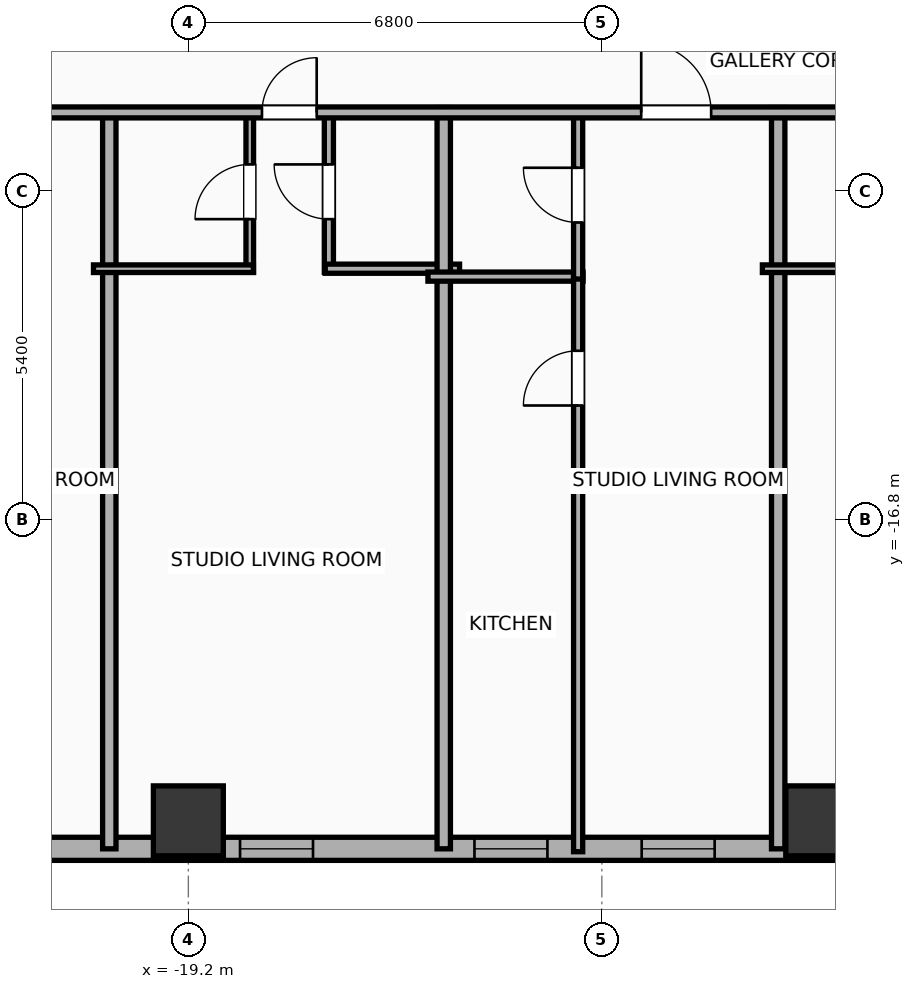
"""IFC4 building model, lengths in metres.
Left out: names, types, materials, properties, quantities, classifications, styles, units other than length and angle.
Written with IfcOpenShell. Run it as: python <this file> out.ifc"""

import sys

from ifc_helpers import new_model, si_unit, direction, frame, frame_2d, origin, origin_2d, place, context, subcontext, project, spatial, rectangle, hollow_rectangle, extrude, element, fill, save


model = new_model("IFC4")
c1 = context("Model", 3, precision=1e-05, world=origin(), true_north=direction((0.0, 1.0)))
c2 = subcontext(c1, "Body", "Model", "MODEL_VIEW")
j1 = project(units=[si_unit("LENGTHUNIT", "METRE"), si_unit("PLANEANGLEUNIT", "RADIAN")], contexts=[c1])
p1 = place(None, origin())
s1 = spatial("IfcSite", under=j1, at=p1, CompositionType="ELEMENT")
p2 = place(p1, origin())
s2 = spatial("IfcBuilding", under=s1, at=p2, CompositionType="ELEMENT")
p3 = place(p2, frame((0.0, 0.0, 68.9)))
s3 = spatial("IfcBuildingStorey", under=s2, at=p3, CompositionType="ELEMENT", Elevation=68.9)
for number, where, z_axis, x_axis in (
    (1, (-19.2, -21.75, 0.0), (0.0, 0.0, 1.0), (1.0, 0.0, 0.0)),
    (2, (-8.8, -21.75, 0.0), (0.0, 0.0, 1.0), (1.0, 0.0, 0.0)),
):
    element("IfcColumn", number, at=place(p3, frame(where, z_axis=z_axis, x_axis=x_axis)), inside=s3, PredefinedType="COLUMN", context=c2, shape_type="SweptSolid", body=[
        extrude(hollow_rectangle(XDim=1.15, YDim=1.15, WallThickness=0.04, at=origin_2d()), origin(), (0.0, 0.0, 1.0), 3.9),
    ])
p4 = place(p3, frame((22.381, -22.21, 0.0), z_axis=(0.0, 0.0, 1.0), x_axis=(-1.0, 0.0, 0.0)))
e3 = element("IfcWall", 3, at=p4, inside=s3, PredefinedType="ELEMENTEDWALL", context=c2, shape_type="SweptSolid", body=[
    extrude(rectangle(XDim=51.963, YDim=0.38, at=frame_2d((25.981, 0.0))), origin(), (0.0, 0.0, 1.0), 3.65),
])
p5 = place(p4, frame((49.127, 0.0, 0.75)))
e4 = element("IfcOpeningElement", 4, at=p5, cuts=e3, PredefinedType="OPENING", context=c2, shape_type="SweptSolid", body=[
    extrude(rectangle(XDim=1.2, YDim=2.05, at=frame_2d((0.6, 1.025))), frame((0.0, 0.2, 0.0), z_axis=(0.0, -1.0, 0.0), x_axis=(1.0, 0.0, 0.0)), (0.0, 0.0, 1.0), 0.4),
])
p6 = place(p4, frame((43.926, 0.0, 0.75)))
e5 = element("IfcOpeningElement", 5, at=p6, cuts=e3, PredefinedType="OPENING", context=c2, shape_type="SweptSolid", body=[
    extrude(rectangle(XDim=1.2, YDim=2.05, at=frame_2d((0.6, 1.025))), frame((0.0, 0.2, 0.0), z_axis=(0.0, -1.0, 0.0), x_axis=(1.0, 0.0, 0.0)), (0.0, 0.0, 1.0), 0.4),
])
p7 = place(p4, frame((46.676, 0.0, 0.75)))
e6 = element("IfcOpeningElement", 6, at=p7, cuts=e3, PredefinedType="OPENING", context=c2, shape_type="SweptSolid", body=[
    extrude(rectangle(XDim=1.2, YDim=2.05, at=frame_2d((0.6, 1.025))), frame((0.0, 0.2, 0.0), z_axis=(0.0, -1.0, 0.0), x_axis=(1.0, 0.0, 0.0)), (0.0, 0.0, 1.0), 0.4),
])
p8 = place(p4, frame((39.531, 0.0, 0.75)))
e7 = element("IfcOpeningElement", 7, at=p8, cuts=e3, PredefinedType="OPENING", context=c2, shape_type="SweptSolid", body=[
    extrude(rectangle(XDim=1.2, YDim=2.05, at=frame_2d((0.6, 1.025))), frame((0.0, 0.2, 0.0), z_axis=(0.0, -1.0, 0.0), x_axis=(1.0, 0.0, 0.0)), (0.0, 0.0, 1.0), 0.4),
])
p9 = place(p4, frame((32.926, 0.0, 0.75)))
e8 = element("IfcOpeningElement", 8, at=p9, cuts=e3, PredefinedType="OPENING", context=c2, shape_type="SweptSolid", body=[
    extrude(rectangle(XDim=1.2, YDim=2.05, at=frame_2d((0.6, 1.025))), frame((0.0, 0.2, 0.0), z_axis=(0.0, -1.0, 0.0), x_axis=(1.0, 0.0, 0.0)), (0.0, 0.0, 1.0), 0.4),
])
p10 = place(p4, frame((35.676, 0.0, 0.75)))
e9 = element("IfcOpeningElement", 9, at=p10, cuts=e3, PredefinedType="OPENING", context=c2, shape_type="SweptSolid", body=[
    extrude(rectangle(XDim=1.2, YDim=2.05, at=frame_2d((0.6, 1.025))), frame((0.0, 0.2, 0.0), z_axis=(0.0, -1.0, 0.0), x_axis=(1.0, 0.0, 0.0)), (0.0, 0.0, 1.0), 0.4),
])
p11 = place(p4, frame((28.531, 0.0, 0.75)))
e10 = element("IfcOpeningElement", 10, at=p11, cuts=e3, PredefinedType="OPENING", context=c2, shape_type="SweptSolid", body=[
    extrude(rectangle(XDim=1.2, YDim=2.05, at=frame_2d((0.6, 1.025))), frame((0.0, 0.2, 0.0), z_axis=(0.0, -1.0, 0.0), x_axis=(1.0, 0.0, 0.0)), (0.0, 0.0, 1.0), 0.4),
])
p12 = place(p4, frame((21.926, 0.0, 0.75)))
e11 = element("IfcOpeningElement", 11, at=p12, cuts=e3, PredefinedType="OPENING", context=c2, shape_type="SweptSolid", body=[
    extrude(rectangle(XDim=1.2, YDim=2.05, at=frame_2d((0.6, 1.025))), frame((0.0, 0.2, 0.0), z_axis=(0.0, -1.0, 0.0), x_axis=(1.0, 0.0, 0.0)), (0.0, 0.0, 1.0), 0.4),
])
p13 = place(p4, frame((24.676, 0.0, 0.75)))
e12 = element("IfcOpeningElement", 12, at=p13, cuts=e3, PredefinedType="OPENING", context=c2, shape_type="SweptSolid", body=[
    extrude(rectangle(XDim=1.2, YDim=2.05, at=frame_2d((0.6, 1.025))), frame((0.0, 0.2, 0.0), z_axis=(0.0, -1.0, 0.0), x_axis=(1.0, 0.0, 0.0)), (0.0, 0.0, 1.0), 0.4),
])
p14 = place(p4, frame((18.636, 0.0, 0.75)))
e13 = element("IfcOpeningElement", 13, at=p14, cuts=e3, PredefinedType="OPENING", context=c2, shape_type="SweptSolid", body=[
    extrude(rectangle(XDim=1.2, YDim=2.05, at=frame_2d((0.6, 1.025))), frame((0.0, 0.2, 0.0), z_axis=(0.0, -1.0, 0.0), x_axis=(1.0, 0.0, 0.0)), (0.0, 0.0, 1.0), 0.4),
])
p15 = place(p4, frame((15.886, 0.0, 0.75)))
e14 = element("IfcOpeningElement", 14, at=p15, cuts=e3, PredefinedType="OPENING", context=c2, shape_type="SweptSolid", body=[
    extrude(rectangle(XDim=1.2, YDim=2.05, at=frame_2d((0.6, 1.025))), frame((0.0, 0.2, 0.0), z_axis=(0.0, -1.0, 0.0), x_axis=(1.0, 0.0, 0.0)), (0.0, 0.0, 1.0), 0.4),
])
p16 = place(p4, frame((12.031, 0.0, 0.75)))
e15 = element("IfcOpeningElement", 15, at=p16, cuts=e3, PredefinedType="OPENING", context=c2, shape_type="SweptSolid", body=[
    extrude(rectangle(XDim=1.2, YDim=2.05, at=frame_2d((0.6, 1.025))), frame((0.0, 0.2, 0.0), z_axis=(0.0, -1.0, 0.0), x_axis=(1.0, 0.0, 0.0)), (0.0, 0.0, 1.0), 0.4),
])
p17 = place(p4, frame((7.636, 0.0, 0.75)))
e16 = element("IfcOpeningElement", 16, at=p17, cuts=e3, PredefinedType="OPENING", context=c2, shape_type="SweptSolid", body=[
    extrude(rectangle(XDim=1.2, YDim=2.05, at=frame_2d((0.6, 1.025))), frame((0.0, 0.2, 0.0), z_axis=(0.0, -1.0, 0.0), x_axis=(1.0, 0.0, 0.0)), (0.0, 0.0, 1.0), 0.4),
])
p18 = place(p4, frame((4.886, 0.0, 0.75)))
e17 = element("IfcOpeningElement", 17, at=p18, cuts=e3, PredefinedType="OPENING", context=c2, shape_type="SweptSolid", body=[
    extrude(rectangle(XDim=1.2, YDim=2.05, at=frame_2d((0.6, 1.025))), frame((0.0, 0.2, 0.0), z_axis=(0.0, -1.0, 0.0), x_axis=(1.0, 0.0, 0.0)), (0.0, 0.0, 1.0), 0.4),
])
p19 = place(p4, frame((2.036, 0.0, 0.75)))
e18 = element("IfcOpeningElement", 18, at=p19, cuts=e3, PredefinedType="OPENING", context=c2, shape_type="SweptSolid", body=[
    extrude(rectangle(XDim=1.2, YDim=2.05, at=frame_2d((0.6, 1.025))), frame((0.0, 0.2, 0.0), z_axis=(0.0, -1.0, 0.0), x_axis=(1.0, 0.0, 0.0)), (0.0, 0.0, 1.0), 0.4),
])
p20 = place(p3, frame((-20.5, -22.21, 0.0), z_axis=(0.0, 0.0, 1.0), x_axis=(0.0, 1.0, 0.0)))
e19 = element("IfcWall", 19, at=p20, inside=s3, PredefinedType="PARTITIONING", context=c2, shape_type="SweptSolid", body=[
    extrude(rectangle(XDim=12.19, YDim=0.22, at=frame_2d((6.095, 0.0))), origin(), (0.0, 0.0, 1.0), 3.65),
])
p21 = place(p3, frame((-18.19, -12.73, 0.0), z_axis=(0.0, 0.0, 1.0), x_axis=(0.0, 1.0, 0.0)))
e20 = element("IfcWall", 20, at=p21, inside=s3, PredefinedType="PARTITIONING", context=c2, shape_type="SweptSolid", body=[
    extrude(rectangle(XDim=2.65, YDim=0.125, at=frame_2d((1.325, 0.0))), origin(), (0.0, 0.0, 1.0), 3.65),
])
p22 = place(p21, frame((0.875, 0.0, 0.0)))
e21 = element("IfcOpeningElement", 21, at=p22, cuts=e20, PredefinedType="OPENING", context=c2, shape_type="SweptSolid", body=[
    extrude(rectangle(XDim=0.9, YDim=2.05, at=frame_2d((0.45, 1.025))), frame((0.0, 0.073, 0.0), z_axis=(0.0, -1.0, 0.0), x_axis=(1.0, 0.0, 0.0)), (0.0, 0.0, 1.0), 0.145),
])
p23 = place(p3, frame((-16.889, -12.73, 0.0), z_axis=(0.0, 0.0, 1.0), x_axis=(0.0, 1.0, 0.0)))
e22 = element("IfcWall", 22, at=p23, inside=s3, PredefinedType="PLUMBINGWALL", context=c2, shape_type="SweptSolid", body=[
    extrude(rectangle(XDim=2.65, YDim=0.15, at=frame_2d((1.325, 0.0))), origin(), (0.0, 0.0, 1.0), 3.65),
])
p24 = place(p23, frame((0.875, 0.0, 0.0)))
e23 = element("IfcOpeningElement", 23, at=p24, cuts=e22, PredefinedType="OPENING", context=c2, shape_type="SweptSolid", body=[
    extrude(rectangle(XDim=0.9, YDim=2.05, at=frame_2d((0.45, 1.025))), frame((0.0, 0.085, 0.0), z_axis=(0.0, -1.0, 0.0), x_axis=(1.0, 0.0, 0.0)), (0.0, 0.0, 1.0), 0.17),
])
p25 = place(p3, frame((-20.76, -12.67, 0.0), z_axis=(0.0, 0.0, 1.0), x_axis=(1.0, 0.0, 0.0)))
e24 = element("IfcWall", 24, at=p25, inside=s3, PredefinedType="PARTITIONING", context=c2, shape_type="SweptSolid", body=[
    extrude(rectangle(XDim=2.63, YDim=0.125, at=frame_2d((1.315, 0.0))), origin(), (0.0, 0.0, 1.0), 3.65),
])
p26 = place(p3, frame((-16.949, -12.67, 0.0), z_axis=(0.0, 0.0, 1.0), x_axis=(1.0, 0.0, 0.0)))
e25 = element("IfcWall", 25, at=p26, inside=s3, PredefinedType="PLUMBINGWALL", context=c2, shape_type="SweptSolid", body=[
    extrude(rectangle(XDim=2.209, YDim=0.15, at=frame_2d((1.104, 0.0))), origin(), (0.0, 0.0, 1.0), 3.65),
])
p27 = place(p3, frame((-15.0, -22.21, 0.0), z_axis=(0.0, 0.0, 1.0), x_axis=(0.0, 1.0, 0.0)))
e26 = element("IfcWall", 26, at=p27, inside=s3, PredefinedType="PARTITIONING", context=c2, shape_type="SweptSolid", body=[
    extrude(rectangle(XDim=12.19, YDim=0.22, at=frame_2d((6.095, 0.0))), origin(), (0.0, 0.0, 1.0), 3.65),
])
p28 = place(p3, frame((-15.26, -12.8, 0.0), z_axis=(0.0, 0.0, 1.0), x_axis=(1.0, 0.0, 0.0)))
e27 = element("IfcWall", 27, at=p28, inside=s3, PredefinedType="PLUMBINGWALL", context=c2, shape_type="SweptSolid", body=[
    extrude(rectangle(XDim=2.55, YDim=0.15, at=frame_2d((1.275, 0.0))), origin(), (0.0, 0.0, 1.0), 3.65),
])
p29 = place(p3, frame((-12.79, -22.258, 0.0), z_axis=(0.0, 0.0, 1.0), x_axis=(0.0, 1.0, 0.0)))
e28 = element("IfcWall", 28, at=p29, inside=s3, PredefinedType="PLUMBINGWALL", context=c2, shape_type="SweptSolid", body=[
    extrude(rectangle(XDim=9.498, YDim=0.15, at=frame_2d((4.749, 0.0))), origin(), (0.0, 0.0, 1.0), 3.65),
])
p30 = place(p29, frame((7.338, 0.0, 0.0)))
e29 = element("IfcOpeningElement", 29, at=p30, cuts=e28, PredefinedType="OPENING", context=c2, shape_type="SweptSolid", body=[
    extrude(rectangle(XDim=0.9, YDim=2.05, at=frame_2d((0.45, 1.025))), frame((0.0, 0.085, 0.0), z_axis=(0.0, -1.0, 0.0), x_axis=(1.0, 0.0, 0.0)), (0.0, 0.0, 1.0), 0.17),
])
p31 = place(p3, frame((-12.79, -12.84, 0.0), z_axis=(0.0, 0.0, 1.0), x_axis=(0.0, 1.0, 0.0)))
e30 = element("IfcWall", 30, at=p31, inside=s3, PredefinedType="PLUMBINGWALL", context=c2, shape_type="SweptSolid", body=[
    extrude(rectangle(XDim=2.76, YDim=0.15, at=frame_2d((1.38, 0.0))), origin(), (0.0, 0.0, 1.0), 3.65),
])
p32 = place(p31, frame((0.93, 0.0, 0.0)))
e31 = element("IfcOpeningElement", 31, at=p32, cuts=e30, PredefinedType="OPENING", context=c2, shape_type="SweptSolid", body=[
    extrude(rectangle(XDim=0.9, YDim=2.05, at=frame_2d((0.45, 1.025))), frame((0.0, 0.085, 0.0), z_axis=(0.0, -1.0, 0.0), x_axis=(1.0, 0.0, 0.0)), (0.0, 0.0, 1.0), 0.17),
])
p33 = place(p3, frame((-9.5, -22.21, 0.0), z_axis=(0.0, 0.0, 1.0), x_axis=(0.0, 1.0, 0.0)))
e32 = element("IfcWall", 32, at=p33, inside=s3, PredefinedType="PARTITIONING", context=c2, shape_type="SweptSolid", body=[
    extrude(rectangle(XDim=12.19, YDim=0.22, at=frame_2d((6.095, 0.0))), origin(), (0.0, 0.0, 1.0), 2.94),
])
p34 = place(p3, frame((-9.76, -12.67, 0.0), z_axis=(0.0, 0.0, 1.0), x_axis=(1.0, 0.0, 0.0)))
e33 = element("IfcWall", 33, at=p34, inside=s3, PredefinedType="PARTITIONING", context=c2, shape_type="SweptSolid", body=[
    extrude(rectangle(XDim=2.63, YDim=0.125, at=frame_2d((1.315, 0.0))), origin(), (0.0, 0.0, 1.0), 3.65),
])
p35 = place(p3, frame((-33.41, -10.1, 0.0), z_axis=(0.0, 0.0, 1.0), x_axis=(1.0, 0.0, 0.0)))
e34 = element("IfcWall", 34, at=p35, inside=s3, PredefinedType="PARTITIONING", context=c2, shape_type="SweptSolid", body=[
    extrude(rectangle(XDim=59.62, YDim=0.18, at=frame_2d((29.81, 0.0))), origin(), (0.0, 0.0, 1.0), 3.65),
])
p36 = place(p35, frame((3.259, 0.0, 0.0)))
e35 = element("IfcOpeningElement", 35, at=p36, cuts=e34, PredefinedType="OPENING", context=c2, shape_type="SweptSolid", body=[
    extrude(rectangle(XDim=1.15, YDim=2.05, at=frame_2d((0.575, 1.025))), frame((0.0, 0.1, 0.0), z_axis=(0.0, -1.0, 0.0), x_axis=(1.0, 0.0, 0.0)), (0.0, 0.0, 1.0), 0.2),
])
p37 = place(p35, frame((10.657, 0.0, 0.0)))
e36 = element("IfcOpeningElement", 36, at=p37, cuts=e34, PredefinedType="OPENING", context=c2, shape_type="SweptSolid", body=[
    extrude(rectangle(XDim=1.15, YDim=2.05, at=frame_2d((0.575, 1.025))), frame((0.0, 0.1, 0.0), z_axis=(0.0, -1.0, 0.0), x_axis=(1.0, 0.0, 0.0)), (0.0, 0.0, 1.0), 0.2),
])
p38 = place(p35, frame((15.421, 0.0, 0.0)))
e37 = element("IfcOpeningElement", 37, at=p38, cuts=e34, PredefinedType="OPENING", context=c2, shape_type="SweptSolid", body=[
    extrude(rectangle(XDim=0.9, YDim=2.05, at=frame_2d((0.45, 1.025))), frame((0.0, 0.1, 0.0), z_axis=(0.0, -1.0, 0.0), x_axis=(1.0, 0.0, 0.0)), (0.0, 0.0, 1.0), 0.2),
])
p39 = place(p35, frame((21.657, 0.0, 0.0)))
e38 = element("IfcOpeningElement", 38, at=p39, cuts=e34, PredefinedType="OPENING", context=c2, shape_type="SweptSolid", body=[
    extrude(rectangle(XDim=1.15, YDim=2.05, at=frame_2d((0.575, 1.025))), frame((0.0, 0.1, 0.0), z_axis=(0.0, -1.0, 0.0), x_axis=(1.0, 0.0, 0.0)), (0.0, 0.0, 1.0), 0.2),
])
p40 = place(p35, frame((26.421, 0.0, 0.0)))
e39 = element("IfcOpeningElement", 39, at=p40, cuts=e34, PredefinedType="OPENING", context=c2, shape_type="SweptSolid", body=[
    extrude(rectangle(XDim=0.9, YDim=2.05, at=frame_2d((0.45, 1.025))), frame((0.0, 0.1, 0.0), z_axis=(0.0, -1.0, 0.0), x_axis=(1.0, 0.0, 0.0)), (0.0, 0.0, 1.0), 0.2),
])
p41 = place(p35, frame((32.657, 0.0, 0.0)))
e40 = element("IfcOpeningElement", 40, at=p41, cuts=e34, PredefinedType="OPENING", context=c2, shape_type="SweptSolid", body=[
    extrude(rectangle(XDim=1.15, YDim=2.05, at=frame_2d((0.575, 1.025))), frame((0.0, 0.1, 0.0), z_axis=(0.0, -1.0, 0.0), x_axis=(1.0, 0.0, 0.0)), (0.0, 0.0, 1.0), 0.2),
])
p42 = place(p35, frame((36.008, 0.0, 0.0)))
e41 = element("IfcOpeningElement", 41, at=p42, cuts=e34, PredefinedType="OPENING", context=c2, shape_type="SweptSolid", body=[
    extrude(rectangle(XDim=1.15, YDim=2.05, at=frame_2d((0.575, 1.025))), frame((0.0, 0.1, 0.0), z_axis=(0.0, -1.0, 0.0), x_axis=(1.0, 0.0, 0.0)), (0.0, 0.0, 1.0), 0.2),
])
p43 = place(p35, frame((42.917, 0.0, 0.0)))
e42 = element("IfcOpeningElement", 42, at=p43, cuts=e34, PredefinedType="OPENING", context=c2, shape_type="SweptSolid", body=[
    extrude(rectangle(XDim=0.9, YDim=2.05, at=frame_2d((0.45, 1.025))), frame((0.0, 0.1, 0.0), z_axis=(0.0, -1.0, 0.0), x_axis=(1.0, 0.0, 0.0)), (0.0, 0.0, 1.0), 0.2),
])
p44 = place(p35, frame((47.008, 0.0, 0.0)))
e43 = element("IfcOpeningElement", 43, at=p44, cuts=e34, PredefinedType="OPENING", context=c2, shape_type="SweptSolid", body=[
    extrude(rectangle(XDim=1.15, YDim=2.05, at=frame_2d((0.575, 1.025))), frame((0.0, 0.1, 0.0), z_axis=(0.0, -1.0, 0.0), x_axis=(1.0, 0.0, 0.0)), (0.0, 0.0, 1.0), 0.2),
])
p45 = place(p35, frame((55.14, 0.0, 0.0)))
e44 = element("IfcOpeningElement", 44, at=p45, cuts=e34, PredefinedType="OPENING", context=c2, shape_type="SweptSolid", body=[
    extrude(rectangle(XDim=1.15, YDim=2.05, at=frame_2d((0.575, 1.025))), frame((0.0, 0.1, 0.0), z_axis=(0.0, -1.0, 0.0), x_axis=(1.0, 0.0, 0.0)), (0.0, 0.0, 1.0), 0.2),
])
p46 = place(p8, origin())
e45 = element("IfcWindow", 45, at=p46, inside=s3, PartitioningType="SINGLE_PANEL", PredefinedType="WINDOW", context=c2, shape_type="SweptSolid", body=[
    extrude(rectangle(XDim=1.2, YDim=2.05, at=frame_2d((0.6, 1.025))), frame((0.0, 0.03, 0.0), z_axis=(0.0, -1.0, 0.0), x_axis=(1.0, 0.0, 0.0)), (0.0, 0.0, 1.0), 0.06),
])
fill(e7, e45)
p47 = place(p9, origin())
e46 = element("IfcWindow", 46, at=p47, inside=s3, PartitioningType="SINGLE_PANEL", PredefinedType="WINDOW", context=c2, shape_type="SweptSolid", body=[
    extrude(rectangle(XDim=1.2, YDim=2.05, at=frame_2d((0.6, 1.025))), frame((0.0, 0.03, 0.0), z_axis=(0.0, -1.0, 0.0), x_axis=(1.0, 0.0, 0.0)), (0.0, 0.0, 1.0), 0.06),
])
fill(e8, e46)
p48 = place(p10, origin())
e47 = element("IfcWindow", 47, at=p48, inside=s3, PartitioningType="SINGLE_PANEL", PredefinedType="WINDOW", context=c2, shape_type="SweptSolid", body=[
    extrude(rectangle(XDim=1.2, YDim=2.05, at=frame_2d((0.6, 1.025))), frame((0.0, 0.03, 0.0), z_axis=(0.0, -1.0, 0.0), x_axis=(1.0, 0.0, 0.0)), (0.0, 0.0, 1.0), 0.06),
])
fill(e9, e47)
p49 = place(p22, origin())
e48 = element("IfcDoor", 48, at=p49, inside=s3, OperationType="SINGLE_SWING_LEFT", PredefinedType="DOOR", context=c2, shape_type="SweptSolid", body=[
    extrude(rectangle(XDim=0.9, YDim=2.05, at=frame_2d((0.45, 1.025))), frame((0.0, 0.025, 0.0), z_axis=(0.0, -1.0, 0.0), x_axis=(1.0, 0.0, 0.0)), (0.0, 0.0, 1.0), 0.05),
])
fill(e21, e48)
p50 = place(p24, origin())
e49 = element("IfcDoor", 49, at=p50, inside=s3, OperationType="SINGLE_SWING_RIGHT", PredefinedType="DOOR", context=c2, shape_type="SweptSolid", body=[
    extrude(rectangle(XDim=0.9, YDim=2.05, at=frame_2d((0.45, 1.025))), frame((0.0, 0.025, 0.0), z_axis=(0.0, -1.0, 0.0), x_axis=(1.0, 0.0, 0.0)), (0.0, 0.0, 1.0), 0.05),
])
fill(e23, e49)
p51 = place(p30, origin())
e50 = element("IfcDoor", 50, at=p51, inside=s3, OperationType="SINGLE_SWING_LEFT", PredefinedType="DOOR", context=c2, shape_type="SweptSolid", body=[
    extrude(rectangle(XDim=0.9, YDim=2.05, at=frame_2d((0.45, 1.025))), frame((0.0, 0.025, 0.0), z_axis=(0.0, -1.0, 0.0), x_axis=(1.0, 0.0, 0.0)), (0.0, 0.0, 1.0), 0.05),
])
fill(e29, e50)
p52 = place(p32, origin())
e51 = element("IfcDoor", 51, at=p52, inside=s3, OperationType="SINGLE_SWING_RIGHT", PredefinedType="DOOR", context=c2, shape_type="SweptSolid", body=[
    extrude(rectangle(XDim=0.9, YDim=2.05, at=frame_2d((0.45, 1.025))), frame((0.0, 0.025, 0.0), z_axis=(0.0, -1.0, 0.0), x_axis=(1.0, 0.0, 0.0)), (0.0, 0.0, 1.0), 0.05),
])
fill(e31, e51)
p53 = place(p38, origin())
e52 = element("IfcDoor", 52, at=p53, inside=s3, OperationType="SINGLE_SWING_RIGHT", PredefinedType="DOOR", context=c2, shape_type="SweptSolid", body=[
    extrude(rectangle(XDim=0.9, YDim=2.05, at=frame_2d((0.45, 1.025))), frame((0.0, 0.025, 0.0), z_axis=(0.0, -1.0, 0.0), x_axis=(1.0, 0.0, 0.0)), (0.0, 0.0, 1.0), 0.05),
])
fill(e37, e52)
p54 = place(p39, origin())
e53 = element("IfcDoor", 53, at=p54, inside=s3, OperationType="SINGLE_SWING_LEFT", PredefinedType="DOOR", context=c2, shape_type="SweptSolid", body=[
    extrude(rectangle(XDim=1.15, YDim=2.05, at=frame_2d((0.575, 1.025))), frame((0.0, 0.025, 0.0), z_axis=(0.0, -1.0, 0.0), x_axis=(1.0, 0.0, 0.0)), (0.0, 0.0, 1.0), 0.05),
])
fill(e38, e53)
save(model, sys.argv[1])
